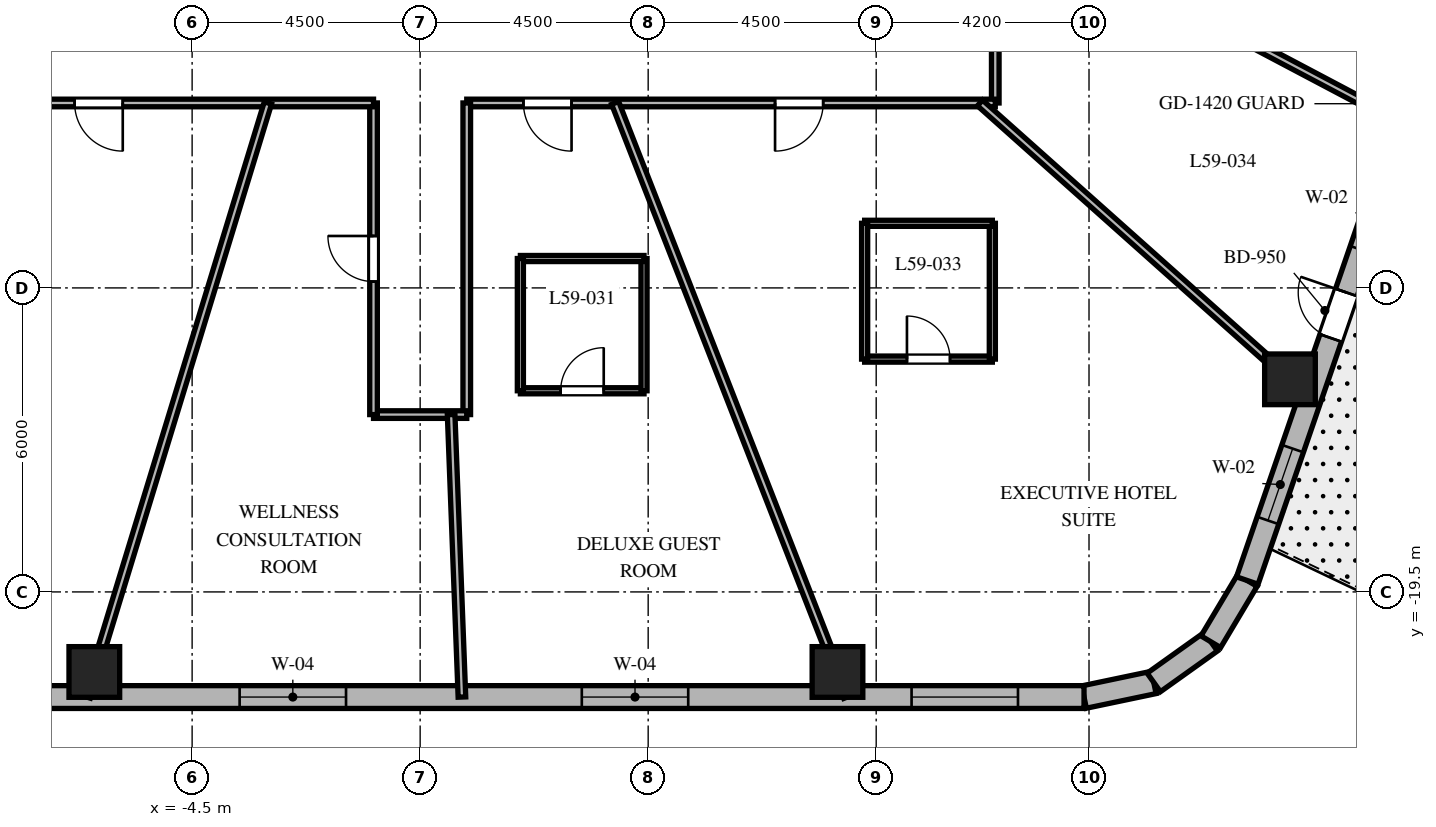
"""IFC4 building model, lengths in metres.
Left out: names, types, materials, properties, quantities, classifications, styles, units other than length and angle.
Written with IfcOpenShell. Run it as: python <this file> out.ifc"""

import sys

from ifc_helpers import new_model, si_unit, direction, frame, frame_2d, origin, origin_2d, place, context, subcontext, project, spatial, rectangle, extrude, element, fill, save


model = new_model("IFC4")
c1 = context("Model", 3, precision=1e-05, world=origin(), true_north=direction((0.0, 1.0)))
c2 = subcontext(c1, "Body", "Model", "MODEL_VIEW")
j1 = project(units=[si_unit("LENGTHUNIT", "METRE"), si_unit("PLANEANGLEUNIT", "RADIAN")], contexts=[c1])
p1 = place(None, origin())
s1 = spatial("IfcSite", under=j1, at=p1, CompositionType="ELEMENT")
p2 = place(p1, origin())
s2 = spatial("IfcBuilding", under=s1, at=p2, CompositionType="ELEMENT")
p3 = place(p2, frame((0.0, 0.0, 236.9)))
s3 = spatial("IfcBuildingStorey", under=s2, at=p3, CompositionType="ELEMENT", Elevation=236.9)
for number, where, z_axis, x_axis in (
    (1, (-6.43, -21.08, 0.0), (0.0, 0.0, 1.0), (1.0, 0.0, 0.0)),
    (2, (8.236, -21.08, 0.0), (0.0, 0.0, 1.0), (1.0, 0.0, 0.0)),
    (3, (17.166, -15.304, 0.0), (0.0, 0.0, 1.0), (1.0, 0.0, 0.0)),
):
    element("IfcColumn", number, at=place(p3, frame(where, z_axis=z_axis, x_axis=x_axis)), inside=s3, PredefinedType="COLUMN", context=c2, shape_type="SweptSolid", body=[
        extrude(rectangle(XDim=1.0, YDim=1.0, at=origin_2d()), origin(), (0.0, 0.0, 1.0), 3.8),
    ])
p4 = place(p3, frame((13.102, -21.575, 0.0), z_axis=(0.0, 0.0, 1.0), x_axis=(0.978757421505, 0.205021730188, 0.0)))
e4 = element("IfcWall", 4, at=p4, inside=s3, PredefinedType="SOLIDWALL", context=c2, shape_type="SweptSolid", body=[
    extrude(rectangle(XDim=1.406, YDim=0.45, at=frame_2d((0.703, 0.0))), origin(), (0.0, 0.0, 1.0), 3.5),
])
p5 = place(p3, frame((14.478, -21.287, 0.0), z_axis=(0.0, 0.0, 1.0), x_axis=(0.813888518617, 0.58102106611, 0.0)))
e5 = element("IfcWall", 5, at=p5, inside=s3, PredefinedType="SOLIDWALL", context=c2, shape_type="SweptSolid", body=[
    extrude(rectangle(XDim=1.383, YDim=0.45, at=frame_2d((0.691, 0.0))), origin(), (0.0, 0.0, 1.0), 3.5),
])
p6 = place(p3, frame((15.604, -20.483, 0.0), z_axis=(0.0, 0.0, 1.0), x_axis=(0.512222149036, 0.858852996756, 0.0)))
e6 = element("IfcWall", 6, at=p6, inside=s3, PredefinedType="SOLIDWALL", context=c2, shape_type="SweptSolid", body=[
    extrude(rectangle(XDim=1.406, YDim=0.45, at=frame_2d((0.703, 0.0))), origin(), (0.0, 0.0, 1.0), 3.5),
])
p7 = place(p3, frame((-11.298, -21.575, 0.0), z_axis=(0.0, 0.0, 1.0), x_axis=(1.0, 0.0, 0.0)))
e7 = element("IfcWall", 7, at=p7, inside=s3, PredefinedType="SOLIDWALL", context=c2, shape_type="SweptSolid", body=[
    extrude(rectangle(XDim=24.399, YDim=0.45, at=frame_2d((12.2, 0.0))), origin(), (0.0, 0.0, 1.0), 3.5),
])
p8 = place(p7, frame((1.304, 0.0, 0.8)))
e8 = element("IfcOpeningElement", 8, at=p8, cuts=e7, PredefinedType="OPENING", context=c2, shape_type="SweptSolid", body=[
    extrude(rectangle(XDim=2.1, YDim=1.85, at=frame_2d((1.05, 0.925))), frame((0.0, 0.235, 0.0), z_axis=(0.0, -1.0, 0.0), x_axis=(1.0, 0.0, 0.0)), (0.0, 0.0, 1.0), 0.47),
])
p9 = place(p7, frame((7.735, 0.0, 0.8)))
e9 = element("IfcOpeningElement", 9, at=p9, cuts=e7, PredefinedType="OPENING", context=c2, shape_type="SweptSolid", body=[
    extrude(rectangle(XDim=2.1, YDim=1.85, at=frame_2d((1.05, 0.925))), frame((0.0, 0.235, 0.0), z_axis=(0.0, -1.0, 0.0), x_axis=(1.0, 0.0, 0.0)), (0.0, 0.0, 1.0), 0.47),
])
p10 = place(p7, frame((14.488, 0.0, 0.8)))
e10 = element("IfcOpeningElement", 10, at=p10, cuts=e7, PredefinedType="OPENING", context=c2, shape_type="SweptSolid", body=[
    extrude(rectangle(XDim=2.1, YDim=1.85, at=frame_2d((1.05, 0.925))), frame((0.0, 0.235, 0.0), z_axis=(0.0, -1.0, 0.0), x_axis=(1.0, 0.0, 0.0)), (0.0, 0.0, 1.0), 0.47),
])
p11 = place(p7, frame((20.996, 0.0, 0.8)))
e11 = element("IfcOpeningElement", 11, at=p11, cuts=e7, PredefinedType="OPENING", context=c2, shape_type="SweptSolid", body=[
    extrude(rectangle(XDim=2.1, YDim=1.85, at=frame_2d((1.05, 0.925))), frame((0.0, 0.235, 0.0), z_axis=(0.0, -1.0, 0.0), x_axis=(1.0, 0.0, 0.0)), (0.0, 0.0, 1.0), 0.47),
])
p12 = place(p3, frame((16.324, -19.275, 0.0), z_axis=(0.0, 0.0, 1.0), x_axis=(0.325083142304, 0.945685439557, 0.0)))
e12 = element("IfcWall", 12, at=p12, inside=s3, PredefinedType="SOLIDWALL", context=c2, shape_type="SweptSolid", body=[
    extrude(rectangle(XDim=20.224, YDim=0.45, at=frame_2d((10.112, 0.0))), origin(), (0.0, 0.0, 1.0), 3.5),
])
p13 = place(p12, frame((5.062, 0.0, 0.0)))
e13 = element("IfcOpeningElement", 13, at=p13, cuts=e12, PredefinedType="OPENING", context=c2, shape_type="SweptSolid", body=[
    extrude(rectangle(XDim=0.95, YDim=2.15, at=frame_2d((0.475, 1.075))), frame((0.0, 0.235, 0.0), z_axis=(0.0, -1.0, 0.0), x_axis=(1.0, 0.0, 0.0)), (0.0, 0.0, 1.0), 0.47),
])
p14 = place(p12, frame((1.253, 0.0, 0.8)))
e14 = element("IfcOpeningElement", 14, at=p14, cuts=e12, PredefinedType="OPENING", context=c2, shape_type="SweptSolid", body=[
    extrude(rectangle(XDim=1.5, YDim=1.8, at=frame_2d((0.75, 0.9))), frame((0.0, 0.235, 0.0), z_axis=(0.0, -1.0, 0.0), x_axis=(1.0, 0.0, 0.0)), (0.0, 0.0, 1.0), 0.47),
])
p15 = place(p12, frame((6.904, 0.0, 0.8)))
e15 = element("IfcOpeningElement", 15, at=p15, cuts=e12, PredefinedType="OPENING", context=c2, shape_type="SweptSolid", body=[
    extrude(rectangle(XDim=1.5, YDim=1.8, at=frame_2d((0.75, 0.9))), frame((0.0, 0.235, 0.0), z_axis=(0.0, -1.0, 0.0), x_axis=(1.0, 0.0, 0.0)), (0.0, 0.0, 1.0), 0.47),
])
p16 = place(p12, frame((11.885, 0.0, 0.8)))
e16 = element("IfcOpeningElement", 16, at=p16, cuts=e12, PredefinedType="OPENING", context=c2, shape_type="SweptSolid", body=[
    extrude(rectangle(XDim=1.5, YDim=1.8, at=frame_2d((0.75, 0.9))), frame((0.0, 0.235, 0.0), z_axis=(0.0, -1.0, 0.0), x_axis=(1.0, 0.0, 0.0)), (0.0, 0.0, 1.0), 0.47),
])
p17 = place(p12, frame((17.418, 0.0, 0.8)))
e17 = element("IfcOpeningElement", 17, at=p17, cuts=e12, PredefinedType="OPENING", context=c2, shape_type="SweptSolid", body=[
    extrude(rectangle(XDim=1.5, YDim=1.8, at=frame_2d((0.75, 0.9))), frame((0.0, 0.235, 0.0), z_axis=(0.0, -1.0, 0.0), x_axis=(1.0, 0.0, 0.0)), (0.0, 0.0, 1.0), 0.47),
])
p18 = place(p3, frame((11.35, -4.4, 0.0), z_axis=(0.0, 0.0, 1.0), x_axis=(0.0, -1.0, 0.0)))
e18 = element("IfcWall", 18, at=p18, inside=s3, PredefinedType="PARTITIONING", context=c2, shape_type="SweptSolid", body=[
    extrude(rectangle(XDim=5.45, YDim=0.15, at=frame_2d((2.725, 0.0))), origin(), (0.0, 0.0, 1.0), 2.99),
])
p19 = place(p18, frame((2.955, 0.0, 0.0)))
e19 = element("IfcOpeningElement", 19, at=p19, cuts=e18, PredefinedType="OPENING", context=c2, shape_type="SweptSolid", body=[
    extrude(rectangle(XDim=0.9, YDim=2.03, at=frame_2d((0.45, 1.015))), frame((0.0, 0.085, 0.0), z_axis=(0.0, -1.0, 0.0), x_axis=(1.0, 0.0, 0.0)), (0.0, 0.0, 1.0), 0.17),
])
p20 = place(p3, frame((11.35, -9.85, 0.0), z_axis=(0.0, 0.0, 1.0), x_axis=(-1.0, 0.0, 0.0)))
e20 = element("IfcWall", 20, at=p20, inside=s3, PredefinedType="PARTITIONING", context=c2, shape_type="SweptSolid", body=[
    extrude(rectangle(XDim=10.43, YDim=0.15, at=frame_2d((5.215, 0.0))), origin(), (0.0, 0.0, 1.0), 2.99),
])
p21 = place(p20, frame((8.362, 0.0, 0.0)))
e21 = element("IfcOpeningElement", 21, at=p21, cuts=e20, PredefinedType="OPENING", context=c2, shape_type="SweptSolid", body=[
    extrude(rectangle(XDim=0.95, YDim=2.03, at=frame_2d((0.475, 1.015))), frame((0.0, 0.085, 0.0), z_axis=(0.0, -1.0, 0.0), x_axis=(1.0, 0.0, 0.0)), (0.0, 0.0, 1.0), 0.17),
])
p22 = place(p20, frame((3.396, 0.0, 0.0)))
e22 = element("IfcOpeningElement", 22, at=p22, cuts=e20, PredefinedType="OPENING", context=c2, shape_type="SweptSolid", body=[
    extrude(rectangle(XDim=0.95, YDim=2.03, at=frame_2d((0.475, 1.015))), frame((0.0, 0.085, 0.0), z_axis=(0.0, -1.0, 0.0), x_axis=(1.0, 0.0, 0.0)), (0.0, 0.0, 1.0), 0.17),
])
p23 = place(p3, frame((0.92, -9.85, 0.0), z_axis=(0.0, 0.0, 1.0), x_axis=(0.0, -1.0, 0.0)))
e23 = element("IfcWall", 23, at=p23, inside=s3, PredefinedType="PARTITIONING", context=c2, shape_type="SweptSolid", body=[
    extrude(rectangle(XDim=6.15, YDim=0.15, at=frame_2d((3.075, 0.0))), origin(), (0.0, 0.0, 1.0), 3.027),
])
p24 = place(p3, frame((0.92, -16.0, 0.0), z_axis=(0.0, 0.0, 1.0), x_axis=(-1.0, 0.0, 0.0)))
e24 = element("IfcWall", 24, at=p24, inside=s3, PredefinedType="PARTITIONING", context=c2, shape_type="SweptSolid", body=[
    extrude(rectangle(XDim=1.84, YDim=0.15, at=frame_2d((0.92, 0.0))), origin(), (0.0, 0.0, 1.0), 3.5),
])
p25 = place(p3, frame((-0.92, -16.0, 0.0), z_axis=(0.0, 0.0, 1.0), x_axis=(0.0, 1.0, 0.0)))
e25 = element("IfcWall", 25, at=p25, inside=s3, PredefinedType="PARTITIONING", context=c2, shape_type="SweptSolid", body=[
    extrude(rectangle(XDim=6.15, YDim=0.15, at=frame_2d((3.075, 0.0))), origin(), (0.0, 0.0, 1.0), 3.027),
])
p26 = place(p25, frame((2.625, 0.0, 0.0)))
e26 = element("IfcOpeningElement", 26, at=p26, cuts=e25, PredefinedType="OPENING", context=c2, shape_type="SweptSolid", body=[
    extrude(rectangle(XDim=0.9, YDim=2.03, at=frame_2d((0.45, 1.015))), frame((0.0, 0.085, 0.0), z_axis=(0.0, -1.0, 0.0), x_axis=(1.0, 0.0, 0.0)), (0.0, 0.0, 1.0), 0.17),
])
p27 = place(p3, frame((-0.92, -9.85, 0.0), z_axis=(0.0, 0.0, 1.0), x_axis=(-1.0, 0.0, 0.0)))
e27 = element("IfcWall", 27, at=p27, inside=s3, PredefinedType="PARTITIONING", context=c2, shape_type="SweptSolid", body=[
    extrude(rectangle(XDim=10.43, YDim=0.15, at=frame_2d((5.215, 0.0))), origin(), (0.0, 0.0, 1.0), 2.99),
])
p28 = place(p27, frame((4.949, 0.0, 0.0)))
e28 = element("IfcOpeningElement", 28, at=p28, cuts=e27, PredefinedType="OPENING", context=c2, shape_type="SweptSolid", body=[
    extrude(rectangle(XDim=0.95, YDim=2.03, at=frame_2d((0.475, 1.015))), frame((0.0, 0.085, 0.0), z_axis=(0.0, -1.0, 0.0), x_axis=(1.0, 0.0, 0.0)), (0.0, 0.0, 1.0), 0.17),
])
p29 = place(p3, frame((-3.004, -9.85, 0.0), z_axis=(0.0, 0.0, 1.0), x_axis=(-0.291775760688, -0.956486751333, 0.0)))
e29 = element("IfcWall", 29, at=p29, inside=s3, PredefinedType="PARTITIONING", context=c2, shape_type="SweptSolid", body=[
    extrude(rectangle(XDim=12.258, YDim=0.15, at=frame_2d((6.129, 0.0))), origin(), (0.0, 0.0, 1.0), 2.74),
])
p30 = place(p3, frame((0.612, -16.0, 0.0), z_axis=(0.0, 0.0, 1.0), x_axis=(0.038202877739, -0.999270003619, 0.0)))
e30 = element("IfcWall", 30, at=p30, inside=s3, PredefinedType="PARTITIONING", context=c2, shape_type="SweptSolid", body=[
    extrude(rectangle(XDim=5.579, YDim=0.15, at=frame_2d((2.79, 0.0))), origin(), (0.0, 0.0, 1.0), 2.74),
])
p31 = place(p3, frame((3.848, -9.85, 0.0), z_axis=(0.0, 0.0, 1.0), x_axis=(0.363921778212, -0.931429513889, 0.0)))
e31 = element("IfcWall", 31, at=p31, inside=s3, PredefinedType="PARTITIONING", context=c2, shape_type="SweptSolid", body=[
    extrude(rectangle(XDim=12.588, YDim=0.15, at=frame_2d((6.294, 0.0))), origin(), (0.0, 0.0, 1.0), 2.74),
])
p32 = place(p3, frame((11.048, -9.85, 0.0), z_axis=(0.0, 0.0, 1.0), x_axis=(0.746444434655, -0.665447748492, 0.0)))
e32 = element("IfcWall", 32, at=p32, inside=s3, PredefinedType="PARTITIONING", context=c2, shape_type="SweptSolid", body=[
    extrude(rectangle(XDim=8.732, YDim=0.15, at=frame_2d((4.366, 0.0))), origin(), (0.0, 0.0, 1.0), 2.74),
])
p33 = place(p3, frame((11.35, -5.999, 0.0), z_axis=(0.0, 0.0, 1.0), x_axis=(0.884112301724, -0.467274478161, 0.0)))
e33 = element("IfcWall", 33, at=p33, inside=s3, PredefinedType="PARTITIONING", context=c2, shape_type="SweptSolid", body=[
    extrude(rectangle(XDim=9.129, YDim=0.15, at=frame_2d((4.564, 0.0))), origin(), (0.0, 0.0, 1.0), 2.74),
])
p34 = place(p3, frame((1.978, -15.53, 0.0), z_axis=(0.0, 0.0, 1.0), x_axis=(1.0, 0.0, 0.0)))
e34 = element("IfcWall", 34, at=p34, inside=s3, PredefinedType="PARTITIONING", context=c2, shape_type="SweptSolid", body=[
    extrude(rectangle(XDim=2.44, YDim=0.12, at=frame_2d((1.22, 0.0))), origin(), (0.0, 0.0, 1.0), 3.5),
])
p35 = place(p34, frame((0.795, 0.0, 0.0)))
e35 = element("IfcOpeningElement", 35, at=p35, cuts=e34, PredefinedType="OPENING", context=c2, shape_type="SweptSolid", body=[
    extrude(rectangle(XDim=0.85, YDim=2.03, at=frame_2d((0.425, 1.015))), frame((0.0, 0.07, 0.0), z_axis=(0.0, -1.0, 0.0), x_axis=(1.0, 0.0, 0.0)), (0.0, 0.0, 1.0), 0.14),
])
p36 = place(p3, frame((4.418, -15.53, 0.0), z_axis=(0.0, 0.0, 1.0), x_axis=(0.0, 1.0, 0.0)))
e36 = element("IfcWall", 36, at=p36, inside=s3, PredefinedType="PARTITIONING", context=c2, shape_type="SweptSolid", body=[
    extrude(rectangle(XDim=2.61, YDim=0.12, at=frame_2d((1.305, 0.0))), origin(), (0.0, 0.0, 1.0), 3.027),
])
p37 = place(p3, frame((4.418, -12.92, 0.0), z_axis=(0.0, 0.0, 1.0), x_axis=(-1.0, 0.0, 0.0)))
e37 = element("IfcWall", 37, at=p37, inside=s3, PredefinedType="PARTITIONING", context=c2, shape_type="SweptSolid", body=[
    extrude(rectangle(XDim=2.44, YDim=0.12, at=frame_2d((1.22, 0.0))), origin(), (0.0, 0.0, 1.0), 3.5),
])
p38 = place(p3, frame((1.978, -12.92, 0.0), z_axis=(0.0, 0.0, 1.0), x_axis=(0.0, -1.0, 0.0)))
e38 = element("IfcWall", 38, at=p38, inside=s3, PredefinedType="PARTITIONING", context=c2, shape_type="SweptSolid", body=[
    extrude(rectangle(XDim=2.61, YDim=0.12, at=frame_2d((1.305, 0.0))), origin(), (0.0, 0.0, 1.0), 3.027),
])
p39 = place(p3, frame((8.772, -14.905, 0.0), z_axis=(0.0, 0.0, 1.0), x_axis=(1.0, 0.0, 0.0)))
e39 = element("IfcWall", 39, at=p39, inside=s3, PredefinedType="PARTITIONING", context=c2, shape_type="SweptSolid", body=[
    extrude(rectangle(XDim=2.52, YDim=0.12, at=frame_2d((1.26, 0.0))), origin(), (0.0, 0.0, 1.0), 3.027),
])
p40 = place(p39, frame((0.835, 0.0, 0.0)))
e40 = element("IfcOpeningElement", 40, at=p40, cuts=e39, PredefinedType="OPENING", context=c2, shape_type="SweptSolid", body=[
    extrude(rectangle(XDim=0.85, YDim=2.03, at=frame_2d((0.425, 1.015))), frame((0.0, 0.07, 0.0), z_axis=(0.0, -1.0, 0.0), x_axis=(1.0, 0.0, 0.0)), (0.0, 0.0, 1.0), 0.14),
])
p41 = place(p3, frame((11.292, -14.905, 0.0), z_axis=(0.0, 0.0, 1.0), x_axis=(0.0, 1.0, 0.0)))
e41 = element("IfcWall", 41, at=p41, inside=s3, PredefinedType="PARTITIONING", context=c2, shape_type="SweptSolid", body=[
    extrude(rectangle(XDim=2.68, YDim=0.12, at=frame_2d((1.34, 0.0))), origin(), (0.0, 0.0, 1.0), 3.027),
])
p42 = place(p3, frame((11.292, -12.225, 0.0), z_axis=(0.0, 0.0, 1.0), x_axis=(-1.0, 0.0, 0.0)))
e42 = element("IfcWall", 42, at=p42, inside=s3, PredefinedType="PARTITIONING", context=c2, shape_type="SweptSolid", body=[
    extrude(rectangle(XDim=2.52, YDim=0.12, at=frame_2d((1.26, 0.0))), origin(), (0.0, 0.0, 1.0), 2.99),
])
p43 = place(p3, frame((8.772, -12.225, 0.0), z_axis=(0.0, 0.0, 1.0), x_axis=(0.0, -1.0, 0.0)))
e43 = element("IfcWall", 43, at=p43, inside=s3, PredefinedType="PARTITIONING", context=c2, shape_type="SweptSolid", body=[
    extrude(rectangle(XDim=2.68, YDim=0.12, at=frame_2d((1.34, 0.0))), origin(), (0.0, 0.0, 1.0), 2.99),
])
p44 = place(p9, origin())
e44 = element("IfcWindow", 44, at=p44, inside=s3, PartitioningType="SINGLE_PANEL", PredefinedType="WINDOW", context=c2, shape_type="SweptSolid", body=[
    extrude(rectangle(XDim=2.1, YDim=1.85, at=frame_2d((1.05, 0.925))), frame((0.0, 0.03, 0.0), z_axis=(0.0, -1.0, 0.0), x_axis=(1.0, 0.0, 0.0)), (0.0, 0.0, 1.0), 0.06),
])
fill(e9, e44)
p45 = place(p10, origin())
e45 = element("IfcWindow", 45, at=p45, inside=s3, PartitioningType="SINGLE_PANEL", PredefinedType="WINDOW", context=c2, shape_type="SweptSolid", body=[
    extrude(rectangle(XDim=2.1, YDim=1.85, at=frame_2d((1.05, 0.925))), frame((0.0, 0.03, 0.0), z_axis=(0.0, -1.0, 0.0), x_axis=(1.0, 0.0, 0.0)), (0.0, 0.0, 1.0), 0.06),
])
fill(e10, e45)
p46 = place(p11, origin())
e46 = element("IfcWindow", 46, at=p46, inside=s3, PartitioningType="SINGLE_PANEL", PredefinedType="WINDOW", context=c2, shape_type="SweptSolid", body=[
    extrude(rectangle(XDim=2.1, YDim=1.85, at=frame_2d((1.05, 0.925))), frame((0.0, 0.03, 0.0), z_axis=(0.0, -1.0, 0.0), x_axis=(1.0, 0.0, 0.0)), (0.0, 0.0, 1.0), 0.06),
])
fill(e11, e46)
p47 = place(p13, origin())
e47 = element("IfcDoor", 47, at=p47, inside=s3, OperationType="SINGLE_SWING_RIGHT", PredefinedType="DOOR", context=c2, shape_type="SweptSolid", body=[
    extrude(rectangle(XDim=0.95, YDim=2.15, at=frame_2d((0.475, 1.075))), frame((0.0, 0.025, 0.0), z_axis=(0.0, -1.0, 0.0), x_axis=(1.0, 0.0, 0.0)), (0.0, 0.0, 1.0), 0.05),
])
fill(e13, e47)
p48 = place(p14, origin())
e48 = element("IfcWindow", 48, at=p48, inside=s3, PartitioningType="SINGLE_PANEL", PredefinedType="WINDOW", context=c2, shape_type="SweptSolid", body=[
    extrude(rectangle(XDim=1.5, YDim=1.8, at=frame_2d((0.75, 0.9))), frame((0.0, 0.03, 0.0), z_axis=(0.0, -1.0, 0.0), x_axis=(1.0, 0.0, 0.0)), (0.0, 0.0, 1.0), 0.06),
])
fill(e14, e48)
p49 = place(p28, origin())
e49 = element("IfcDoor", 49, at=p49, inside=s3, OperationType="SINGLE_SWING_LEFT", PredefinedType="DOOR", context=c2, shape_type="SweptSolid", body=[
    extrude(rectangle(XDim=0.95, YDim=2.03, at=frame_2d((0.475, 1.015))), frame((0.0, 0.025, 0.0), z_axis=(0.0, -1.0, 0.0), x_axis=(1.0, 0.0, 0.0)), (0.0, 0.0, 1.0), 0.05),
])
fill(e28, e49)
p50 = place(p26, origin())
e50 = element("IfcDoor", 50, at=p50, inside=s3, OperationType="SINGLE_SWING_RIGHT", PredefinedType="DOOR", context=c2, shape_type="SweptSolid", body=[
    extrude(rectangle(XDim=0.9, YDim=2.03, at=frame_2d((0.45, 1.015))), frame((0.0, 0.025, 0.0), z_axis=(0.0, -1.0, 0.0), x_axis=(1.0, 0.0, 0.0)), (0.0, 0.0, 1.0), 0.05),
])
fill(e26, e50)
p51 = place(p21, origin())
e51 = element("IfcDoor", 51, at=p51, inside=s3, OperationType="SINGLE_SWING_LEFT", PredefinedType="DOOR", context=c2, shape_type="SweptSolid", body=[
    extrude(rectangle(XDim=0.95, YDim=2.03, at=frame_2d((0.475, 1.015))), frame((0.0, 0.025, 0.0), z_axis=(0.0, -1.0, 0.0), x_axis=(1.0, 0.0, 0.0)), (0.0, 0.0, 1.0), 0.05),
])
fill(e21, e51)
p52 = place(p35, origin())
e52 = element("IfcDoor", 52, at=p52, inside=s3, OperationType="SINGLE_SWING_RIGHT", PredefinedType="DOOR", context=c2, shape_type="SweptSolid", body=[
    extrude(rectangle(XDim=0.85, YDim=2.03, at=frame_2d((0.425, 1.015))), frame((0.0, 0.025, 0.0), z_axis=(0.0, -1.0, 0.0), x_axis=(1.0, 0.0, 0.0)), (0.0, 0.0, 1.0), 0.05),
])
fill(e35, e52)
p53 = place(p22, origin())
e53 = element("IfcDoor", 53, at=p53, inside=s3, OperationType="SINGLE_SWING_RIGHT", PredefinedType="DOOR", context=c2, shape_type="SweptSolid", body=[
    extrude(rectangle(XDim=0.95, YDim=2.03, at=frame_2d((0.475, 1.015))), frame((0.0, 0.025, 0.0), z_axis=(0.0, -1.0, 0.0), x_axis=(1.0, 0.0, 0.0)), (0.0, 0.0, 1.0), 0.05),
])
fill(e22, e53)
p54 = place(p40, origin())
e54 = element("IfcDoor", 54, at=p54, inside=s3, OperationType="SINGLE_SWING_LEFT", PredefinedType="DOOR", context=c2, shape_type="SweptSolid", body=[
    extrude(rectangle(XDim=0.85, YDim=2.03, at=frame_2d((0.425, 1.015))), frame((0.0, 0.025, 0.0), z_axis=(0.0, -1.0, 0.0), x_axis=(1.0, 0.0, 0.0)), (0.0, 0.0, 1.0), 0.05),
])
fill(e40, e54)
save(model, sys.argv[1])
